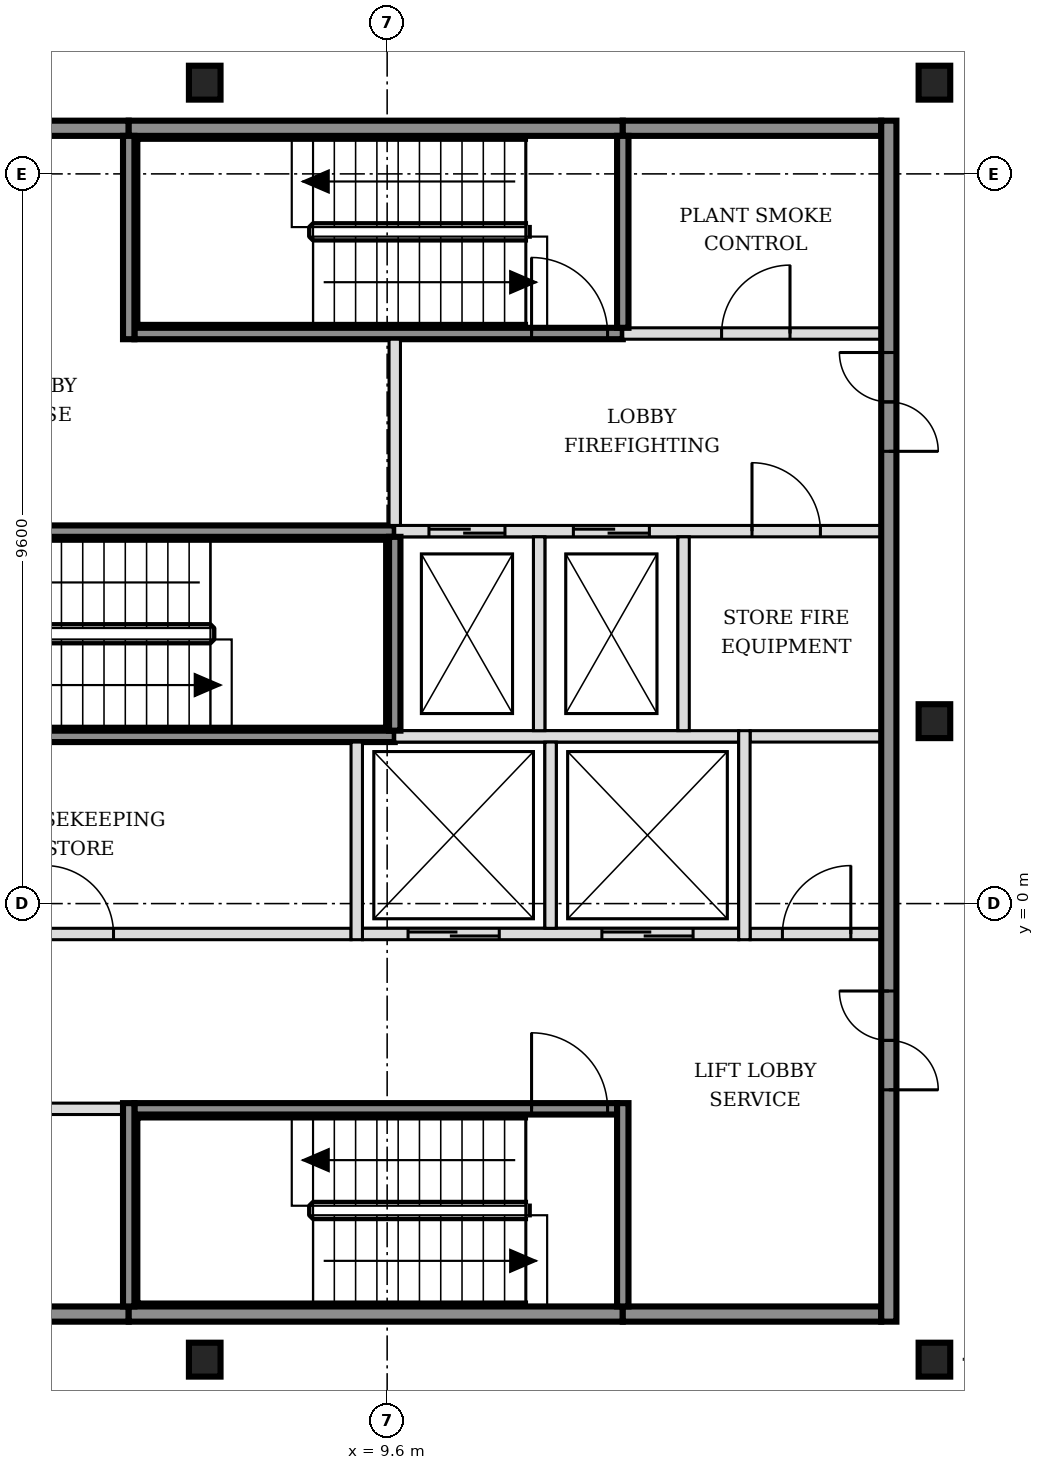
"""IFC4 building model, lengths in metres.
Left out: names, types, materials, properties, quantities, classifications, styles, units other than length and angle.
Written with IfcOpenShell. Run it as: python <this file> out.ifc"""

import sys

from ifc_helpers import new_model, si_unit, direction, frame, frame_2d, origin, origin_2d, place, context, subcontext, project, spatial, rectangle, i_section, extrude, element, fill, save


model = new_model("IFC4")
c1 = context("Model", 3, precision=1e-05, world=origin(), true_north=direction((0.0, 1.0)))
c2 = subcontext(c1, "Body", "Model", "MODEL_VIEW")
j1 = project(units=[si_unit("LENGTHUNIT", "METRE"), si_unit("PLANEANGLEUNIT", "RADIAN")], contexts=[c1])
p1 = place(None, origin())
s1 = spatial("IfcSite", under=j1, at=p1, CompositionType="ELEMENT")
p2 = place(p1, origin())
s2 = spatial("IfcBuilding", under=s1, at=p2, CompositionType="ELEMENT")
p3 = place(p2, frame((0.0, 0.0, 168.6)))
s3 = spatial("IfcBuildingStorey", under=s2, at=p3, CompositionType="ELEMENT", Elevation=168.6)
for number, where, z_axis, x_axis in (
    (1, (7.2, -6.0, -0.15), (0.0, 0.0, 1.0), (1.0, 0.0, 0.0)),
    (2, (16.8, -6.0, -0.15), (0.0, 0.0, 1.0), (1.0, 0.0, 0.0)),
    (3, (16.8, 2.4, -0.15), (0.0, 0.0, 1.0), (1.0, 0.0, 0.0)),
    (4, (7.2, 10.8, -0.15), (0.0, 0.0, 1.0), (1.0, 0.0, 0.0)),
    (5, (16.8, 10.8, -0.15), (0.0, 0.0, 1.0), (1.0, 0.0, 0.0)),
):
    element("IfcColumn", number, at=place(p3, frame(where, z_axis=z_axis, x_axis=x_axis)), inside=s3, PredefinedType="COLUMN", context=c2, shape_type="SweptSolid", body=[
        extrude(i_section(OverallWidth=0.416, OverallDepth=0.446, WebThickness=0.039, FlangeThickness=0.063, FilletRadius=0.015, at=origin_2d()), origin(), (0.0, 0.0, 1.0), 3.6),
    ])
p4 = place(p3, frame((-1.7, -5.4, 0.0), z_axis=(0.0, 0.0, 1.0), x_axis=(1.0, 0.0, 0.0)))
e6 = element("IfcWall", 6, at=p4, inside=s3, PredefinedType="SOLIDWALL", context=c2, shape_type="SweptSolid", body=[
    extrude(rectangle(XDim=7.9, YDim=0.2, at=frame_2d((3.95, 0.0))), origin(), (0.0, 0.0, 1.0), 3.45),
])
p5 = place(p3, frame((6.2, -5.4, 0.0), z_axis=(0.0, 0.0, 1.0), x_axis=(1.0, 0.0, 0.0)))
e7 = element("IfcWall", 7, at=p5, inside=s3, PredefinedType="SOLIDWALL", context=c2, shape_type="SweptSolid", body=[
    extrude(rectangle(XDim=6.5, YDim=0.2, at=frame_2d((3.25, 0.0))), origin(), (0.0, 0.0, 1.0), 3.45),
])
p6 = place(p3, frame((12.7, -5.4, 0.0), z_axis=(0.0, 0.0, 1.0), x_axis=(1.0, 0.0, 0.0)))
e8 = element("IfcWall", 8, at=p6, inside=s3, PredefinedType="SOLIDWALL", context=c2, shape_type="SweptSolid", body=[
    extrude(rectangle(XDim=3.4, YDim=0.2, at=frame_2d((1.7, 0.0))), origin(), (0.0, 0.0, 1.0), 3.45),
])
p7 = place(p3, frame((-1.7, -2.7, 0.0), z_axis=(0.0, 0.0, 1.0), x_axis=(1.0, 0.0, 0.0)))
e9 = element("IfcWall", 9, at=p7, inside=s3, PredefinedType="PARTITIONING", context=c2, shape_type="SweptSolid", body=[
    extrude(rectangle(XDim=7.825, YDim=0.15, at=frame_2d((3.913, 0.0))), origin(), (0.0, 0.0, 1.0), 3.45),
])
p8 = place(p7, frame((3.45, 0.0, 0.0)))
e10 = element("IfcOpeningElement", 10, at=p8, cuts=e9, PredefinedType="OPENING", context=c2, shape_type="SweptSolid", body=[
    extrude(rectangle(XDim=0.9, YDim=2.1, at=frame_2d((0.45, 1.05))), frame((0.0, 0.085, 0.0), z_axis=(0.0, -1.0, 0.0), x_axis=(1.0, 0.0, 0.0)), (0.0, 0.0, 1.0), 0.17),
])
p9 = place(p3, frame((6.275, -2.7, 0.0), z_axis=(0.0, 0.0, 1.0), x_axis=(1.0, 0.0, 0.0)))
e11 = element("IfcWall", 11, at=p9, inside=s3, PredefinedType="SOLIDWALL", context=c2, shape_type="SweptSolid", body=[
    extrude(rectangle(XDim=6.35, YDim=0.15, at=frame_2d((3.175, 0.0))), origin(), (0.0, 0.0, 1.0), 3.45),
])
p10 = place(p9, frame((5.225, 0.0, 0.0)))
e12 = element("IfcOpeningElement", 12, at=p10, cuts=e11, PredefinedType="OPENING", context=c2, shape_type="SweptSolid", body=[
    extrude(rectangle(XDim=1.0, YDim=2.1, at=frame_2d((0.5, 1.05))), frame((0.0, 0.085, 0.0), z_axis=(0.0, -1.0, 0.0), x_axis=(1.0, 0.0, 0.0)), (0.0, 0.0, 1.0), 0.17),
])
p11 = place(p3, frame((-1.7, -0.4, 0.0), z_axis=(0.0, 0.0, 1.0), x_axis=(1.0, 0.0, 0.0)))
e13 = element("IfcWall", 13, at=p11, inside=s3, PredefinedType="PARTITIONING", context=c2, shape_type="SweptSolid", body=[
    extrude(rectangle(XDim=10.825, YDim=0.15, at=frame_2d((5.413, 0.0))), origin(), (0.0, 0.0, 1.0), 3.45),
])
p12 = place(p11, frame((1.3, 0.0, 0.0)))
e14 = element("IfcOpeningElement", 14, at=p12, cuts=e13, PredefinedType="OPENING", context=c2, shape_type="SweptSolid", body=[
    extrude(rectangle(XDim=0.9, YDim=2.1, at=frame_2d((0.45, 1.05))), frame((0.0, 0.085, 0.0), z_axis=(0.0, -1.0, 0.0), x_axis=(1.0, 0.0, 0.0)), (0.0, 0.0, 1.0), 0.17),
])
p13 = place(p11, frame((6.8, 0.0, 0.0)))
e15 = element("IfcOpeningElement", 15, at=p13, cuts=e13, PredefinedType="OPENING", context=c2, shape_type="SweptSolid", body=[
    extrude(rectangle(XDim=0.9, YDim=2.1, at=frame_2d((0.45, 1.05))), frame((0.0, 0.085, 0.0), z_axis=(0.0, -1.0, 0.0), x_axis=(1.0, 0.0, 0.0)), (0.0, 0.0, 1.0), 0.17),
])
p14 = place(p3, frame((9.275, -0.4, 0.0), z_axis=(0.0, 0.0, 1.0), x_axis=(1.0, 0.0, 0.0)))
e16 = element("IfcWall", 16, at=p14, inside=s3, PredefinedType="SOLIDWALL", context=c2, shape_type="SweptSolid", body=[
    extrude(rectangle(XDim=4.95, YDim=0.15, at=frame_2d((2.475, 0.0))), origin(), (0.0, 0.0, 1.0), 3.45),
])
p15 = place(p14, frame((0.6, 0.0, 0.0)))
e17 = element("IfcOpeningElement", 17, at=p15, cuts=e16, PredefinedType="OPENING", context=c2, shape_type="SweptSolid", body=[
    extrude(rectangle(XDim=1.2, YDim=2.1, at=frame_2d((0.6, 1.05))), frame((0.0, 0.085, 0.0), z_axis=(0.0, -1.0, 0.0), x_axis=(1.0, 0.0, 0.0)), (0.0, 0.0, 1.0), 0.17),
])
p16 = place(p14, frame((3.15, 0.0, 0.0)))
e18 = element("IfcOpeningElement", 18, at=p16, cuts=e16, PredefinedType="OPENING", context=c2, shape_type="SweptSolid", body=[
    extrude(rectangle(XDim=1.2, YDim=2.1, at=frame_2d((0.6, 1.05))), frame((0.0, 0.085, 0.0), z_axis=(0.0, -1.0, 0.0), x_axis=(1.0, 0.0, 0.0)), (0.0, 0.0, 1.0), 0.17),
])
p17 = place(p3, frame((14.375, -0.4, 0.0), z_axis=(0.0, 0.0, 1.0), x_axis=(1.0, 0.0, 0.0)))
e19 = element("IfcWall", 19, at=p17, inside=s3, PredefinedType="PARTITIONING", context=c2, shape_type="SweptSolid", body=[
    extrude(rectangle(XDim=1.725, YDim=0.15, at=frame_2d((0.863, 0.0))), origin(), (0.0, 0.0, 1.0), 3.45),
])
p18 = place(p17, frame((0.425, 0.0, 0.0)))
e20 = element("IfcOpeningElement", 20, at=p18, cuts=e19, PredefinedType="OPENING", context=c2, shape_type="SweptSolid", body=[
    extrude(rectangle(XDim=0.9, YDim=2.1, at=frame_2d((0.45, 1.05))), frame((0.0, 0.085, 0.0), z_axis=(0.0, -1.0, 0.0), x_axis=(1.0, 0.0, 0.0)), (0.0, 0.0, 1.0), 0.17),
])
p19 = place(p3, frame((3.2, 2.2, 0.0), z_axis=(0.0, 0.0, 1.0), x_axis=(1.0, 0.0, 0.0)))
e21 = element("IfcWall", 21, at=p19, inside=s3, PredefinedType="SOLIDWALL", context=c2, shape_type="SweptSolid", body=[
    extrude(rectangle(XDim=6.5, YDim=0.15, at=frame_2d((3.25, 0.0))), origin(), (0.0, 0.0, 1.0), 3.45),
])
p20 = place(p3, frame((9.7, 2.2, 0.0), z_axis=(0.0, 0.0, 1.0), x_axis=(1.0, 0.0, 0.0)))
e22 = element("IfcWall", 22, at=p20, inside=s3, PredefinedType="SOLIDWALL", context=c2, shape_type="SweptSolid", body=[
    extrude(rectangle(XDim=4.525, YDim=0.15, at=frame_2d((2.263, 0.0))), origin(), (0.0, 0.0, 1.0), 3.45),
])
p21 = place(p3, frame((14.375, 2.2, 0.0), z_axis=(0.0, 0.0, 1.0), x_axis=(1.0, 0.0, 0.0)))
e23 = element("IfcWall", 23, at=p21, inside=s3, PredefinedType="PARTITIONING", context=c2, shape_type="SweptSolid", body=[
    extrude(rectangle(XDim=1.725, YDim=0.15, at=frame_2d((0.863, 0.0))), origin(), (0.0, 0.0, 1.0), 3.45),
])
p22 = place(p3, frame((3.2, 4.9, 0.0), z_axis=(0.0, 0.0, 1.0), x_axis=(1.0, 0.0, 0.0)))
e24 = element("IfcWall", 24, at=p22, inside=s3, PredefinedType="SOLIDWALL", context=c2, shape_type="SweptSolid", body=[
    extrude(rectangle(XDim=6.5, YDim=0.15, at=frame_2d((3.25, 0.0))), origin(), (0.0, 0.0, 1.0), 3.45),
])
p23 = place(p22, frame((0.175, 0.0, 0.0)))
e25 = element("IfcOpeningElement", 25, at=p23, cuts=e24, PredefinedType="OPENING", context=c2, shape_type="SweptSolid", body=[
    extrude(rectangle(XDim=1.0, YDim=2.1, at=frame_2d((0.5, 1.05))), frame((0.0, 0.085, 0.0), z_axis=(0.0, -1.0, 0.0), x_axis=(1.0, 0.0, 0.0)), (0.0, 0.0, 1.0), 0.17),
])
p24 = place(p3, frame((9.7, 4.9, 0.0), z_axis=(0.0, 0.0, 1.0), x_axis=(1.0, 0.0, 0.0)))
e26 = element("IfcWall", 26, at=p24, inside=s3, PredefinedType="SOLIDWALL", context=c2, shape_type="SweptSolid", body=[
    extrude(rectangle(XDim=6.4, YDim=0.15, at=frame_2d((3.2, 0.0))), origin(), (0.0, 0.0, 1.0), 3.45),
])
p25 = place(p24, frame((0.45, 0.0, 0.0)))
e27 = element("IfcOpeningElement", 27, at=p25, cuts=e26, PredefinedType="OPENING", context=c2, shape_type="SweptSolid", body=[
    extrude(rectangle(XDim=1.0, YDim=2.1, at=frame_2d((0.5, 1.05))), frame((0.0, 0.085, 0.0), z_axis=(0.0, -1.0, 0.0), x_axis=(1.0, 0.0, 0.0)), (0.0, 0.0, 1.0), 0.17),
])
p26 = place(p24, frame((2.35, 0.0, 0.0)))
e28 = element("IfcOpeningElement", 28, at=p26, cuts=e26, PredefinedType="OPENING", context=c2, shape_type="SweptSolid", body=[
    extrude(rectangle(XDim=1.0, YDim=2.1, at=frame_2d((0.5, 1.05))), frame((0.0, 0.085, 0.0), z_axis=(0.0, -1.0, 0.0), x_axis=(1.0, 0.0, 0.0)), (0.0, 0.0, 1.0), 0.17),
])
p27 = place(p24, frame((4.7, 0.0, 0.0)))
e29 = element("IfcOpeningElement", 29, at=p27, cuts=e26, PredefinedType="OPENING", context=c2, shape_type="SweptSolid", body=[
    extrude(rectangle(XDim=0.9, YDim=2.1, at=frame_2d((0.45, 1.05))), frame((0.0, 0.085, 0.0), z_axis=(0.0, -1.0, 0.0), x_axis=(1.0, 0.0, 0.0)), (0.0, 0.0, 1.0), 0.17),
])
p28 = place(p3, frame((6.275, 7.5, 0.0), z_axis=(0.0, 0.0, 1.0), x_axis=(1.0, 0.0, 0.0)))
e30 = element("IfcWall", 30, at=p28, inside=s3, PredefinedType="SOLIDWALL", context=c2, shape_type="SweptSolid", body=[
    extrude(rectangle(XDim=6.425, YDim=0.15, at=frame_2d((3.212, 0.0))), origin(), (0.0, 0.0, 1.0), 3.45),
])
p29 = place(p28, frame((5.225, 0.0, 0.0)))
e31 = element("IfcOpeningElement", 31, at=p29, cuts=e30, PredefinedType="OPENING", context=c2, shape_type="SweptSolid", body=[
    extrude(rectangle(XDim=1.0, YDim=2.1, at=frame_2d((0.5, 1.05))), frame((0.0, 0.085, 0.0), z_axis=(0.0, -1.0, 0.0), x_axis=(1.0, 0.0, 0.0)), (0.0, 0.0, 1.0), 0.17),
])
p30 = place(p3, frame((12.7, 7.5, 0.0), z_axis=(0.0, 0.0, 1.0), x_axis=(1.0, 0.0, 0.0)))
e32 = element("IfcWall", 32, at=p30, inside=s3, PredefinedType="SOLIDWALL", context=c2, shape_type="SweptSolid", body=[
    extrude(rectangle(XDim=3.4, YDim=0.15, at=frame_2d((1.7, 0.0))), origin(), (0.0, 0.0, 1.0), 3.45),
])
p31 = place(p30, frame((1.3, 0.0, 0.0)))
e33 = element("IfcOpeningElement", 33, at=p31, cuts=e32, PredefinedType="OPENING", context=c2, shape_type="SweptSolid", body=[
    extrude(rectangle(XDim=0.9, YDim=2.1, at=frame_2d((0.45, 1.05))), frame((0.0, 0.085, 0.0), z_axis=(0.0, -1.0, 0.0), x_axis=(1.0, 0.0, 0.0)), (0.0, 0.0, 1.0), 0.17),
])
p32 = place(p3, frame((-1.7, 10.2, 0.0), z_axis=(0.0, 0.0, 1.0), x_axis=(1.0, 0.0, 0.0)))
e34 = element("IfcWall", 34, at=p32, inside=s3, PredefinedType="SOLIDWALL", context=c2, shape_type="SweptSolid", body=[
    extrude(rectangle(XDim=7.9, YDim=0.2, at=frame_2d((3.95, 0.0))), origin(), (0.0, 0.0, 1.0), 3.45),
])
p33 = place(p3, frame((6.2, 10.2, 0.0), z_axis=(0.0, 0.0, 1.0), x_axis=(1.0, 0.0, 0.0)))
e35 = element("IfcWall", 35, at=p33, inside=s3, PredefinedType="SOLIDWALL", context=c2, shape_type="SweptSolid", body=[
    extrude(rectangle(XDim=6.5, YDim=0.2, at=frame_2d((3.25, 0.0))), origin(), (0.0, 0.0, 1.0), 3.45),
])
p34 = place(p3, frame((12.7, 10.2, 0.0), z_axis=(0.0, 0.0, 1.0), x_axis=(1.0, 0.0, 0.0)))
e36 = element("IfcWall", 36, at=p34, inside=s3, PredefinedType="SOLIDWALL", context=c2, shape_type="SweptSolid", body=[
    extrude(rectangle(XDim=3.4, YDim=0.2, at=frame_2d((1.7, 0.0))), origin(), (0.0, 0.0, 1.0), 3.45),
])
for number, where, z_axis, x_axis in (
    (37, (6.2, -5.3, 0.0), (0.0, 0.0, 1.0), (0.0, 1.0, 0.0)),
    (38, (6.2, 7.425, 0.0), (0.0, 0.0, 1.0), (0.0, 1.0, 0.0)),
):
    element("IfcWall", number, at=place(p3, frame(where, z_axis=z_axis, x_axis=x_axis)), inside=s3, PredefinedType="SOLIDWALL", context=c2, shape_type="SweptSolid", body=[
        extrude(rectangle(XDim=2.675, YDim=0.15, at=frame_2d((1.337, 0.0))), origin(), (0.0, 0.0, 1.0), 3.45),
    ])
p35 = place(p3, frame((9.2, -0.475, 0.0), z_axis=(0.0, 0.0, 1.0), x_axis=(0.0, 1.0, 0.0)))
e39 = element("IfcWall", 39, at=p35, inside=s3, PredefinedType="SOLIDWALL", context=c2, shape_type="SweptSolid", body=[
    extrude(rectangle(XDim=2.6, YDim=0.15, at=frame_2d((1.3, 0.0))), origin(), (0.0, 0.0, 1.0), 3.45),
])
p36 = place(p3, frame((9.7, 2.275, 0.0), z_axis=(0.0, 0.0, 1.0), x_axis=(0.0, 1.0, 0.0)))
e40 = element("IfcWall", 40, at=p36, inside=s3, PredefinedType="SOLIDWALL", context=c2, shape_type="SweptSolid", body=[
    extrude(rectangle(XDim=2.55, YDim=0.15, at=frame_2d((1.275, 0.0))), origin(), (0.0, 0.0, 1.0), 3.45),
])
p37 = place(p3, frame((9.7, 4.975, 0.0), z_axis=(0.0, 0.0, 1.0), x_axis=(0.0, 1.0, 0.0)))
e41 = element("IfcWall", 41, at=p37, inside=s3, PredefinedType="SOLIDWALL", context=c2, shape_type="SweptSolid", body=[
    extrude(rectangle(XDim=2.45, YDim=0.15, at=frame_2d((1.225, 0.0))), origin(), (0.0, 0.0, 1.0), 3.45),
])
p38 = place(p3, frame((11.6, 2.275, 0.0), z_axis=(0.0, 0.0, 1.0), x_axis=(0.0, 1.0, 0.0)))
e42 = element("IfcWall", 42, at=p38, inside=s3, PredefinedType="SOLIDWALL", context=c2, shape_type="SweptSolid", body=[
    extrude(rectangle(XDim=2.55, YDim=0.15, at=frame_2d((1.275, 0.0))), origin(), (0.0, 0.0, 1.0), 3.45),
])
p39 = place(p3, frame((11.75, -0.325, 0.0), z_axis=(0.0, 0.0, 1.0), x_axis=(0.0, 1.0, 0.0)))
e43 = element("IfcWall", 43, at=p39, inside=s3, PredefinedType="SOLIDWALL", context=c2, shape_type="SweptSolid", body=[
    extrude(rectangle(XDim=2.45, YDim=0.15, at=frame_2d((1.225, 0.0))), origin(), (0.0, 0.0, 1.0), 3.45),
])
p40 = place(p3, frame((12.7, -5.3, 0.0), z_axis=(0.0, 0.0, 1.0), x_axis=(0.0, 1.0, 0.0)))
e44 = element("IfcWall", 44, at=p40, inside=s3, PredefinedType="SOLIDWALL", context=c2, shape_type="SweptSolid", body=[
    extrude(rectangle(XDim=2.675, YDim=0.15, at=frame_2d((1.337, 0.0))), origin(), (0.0, 0.0, 1.0), 3.45),
])
p41 = place(p3, frame((12.7, 7.575, 0.0), z_axis=(0.0, 0.0, 1.0), x_axis=(0.0, 1.0, 0.0)))
e45 = element("IfcWall", 45, at=p41, inside=s3, PredefinedType="SOLIDWALL", context=c2, shape_type="SweptSolid", body=[
    extrude(rectangle(XDim=2.525, YDim=0.15, at=frame_2d((1.263, 0.0))), origin(), (0.0, 0.0, 1.0), 3.45),
])
p42 = place(p3, frame((13.5, 2.275, 0.0), z_axis=(0.0, 0.0, 1.0), x_axis=(0.0, 1.0, 0.0)))
e46 = element("IfcWall", 46, at=p42, inside=s3, PredefinedType="SOLIDWALL", context=c2, shape_type="SweptSolid", body=[
    extrude(rectangle(XDim=2.55, YDim=0.15, at=frame_2d((1.275, 0.0))), origin(), (0.0, 0.0, 1.0), 3.45),
])
p43 = place(p3, frame((14.3, -0.475, 0.0), z_axis=(0.0, 0.0, 1.0), x_axis=(0.0, 1.0, 0.0)))
e47 = element("IfcWall", 47, at=p43, inside=s3, PredefinedType="SOLIDWALL", context=c2, shape_type="SweptSolid", body=[
    extrude(rectangle(XDim=2.75, YDim=0.15, at=frame_2d((1.375, 0.0))), origin(), (0.0, 0.0, 1.0), 3.45),
])
p44 = place(p3, frame((16.2, -5.5, 0.0), z_axis=(0.0, 0.0, 1.0), x_axis=(0.0, 1.0, 0.0)))
e48 = element("IfcWall", 48, at=p44, inside=s3, PredefinedType="SOLIDWALL", context=c2, shape_type="SweptSolid", body=[
    extrude(rectangle(XDim=15.8, YDim=0.2, at=frame_2d((7.9, 0.0))), origin(), (0.0, 0.0, 1.0), 3.45),
])
p45 = place(p44, frame((3.05, 0.0, 0.0)))
e49 = element("IfcOpeningElement", 49, at=p45, cuts=e48, PredefinedType="OPENING", context=c2, shape_type="SweptSolid", body=[
    extrude(rectangle(XDim=1.3, YDim=2.1, at=frame_2d((0.65, 1.05))), frame((0.0, 0.11, 0.0), z_axis=(0.0, -1.0, 0.0), x_axis=(1.0, 0.0, 0.0)), (0.0, 0.0, 1.0), 0.22),
])
p46 = place(p44, frame((11.45, 0.0, 0.0)))
e50 = element("IfcOpeningElement", 50, at=p46, cuts=e48, PredefinedType="OPENING", context=c2, shape_type="SweptSolid", body=[
    extrude(rectangle(XDim=1.3, YDim=2.1, at=frame_2d((0.65, 1.05))), frame((0.0, 0.11, 0.0), z_axis=(0.0, -1.0, 0.0), x_axis=(1.0, 0.0, 0.0)), (0.0, 0.0, 1.0), 0.22),
])
p47 = place(p15, origin())
e51 = element("IfcDoor", 51, at=p47, inside=s3, OperationType="DOUBLE_DOOR_SLIDING", PredefinedType="DOOR", context=c2, shape_type="SweptSolid", body=[
    extrude(rectangle(XDim=1.2, YDim=2.1, at=frame_2d((0.6, 1.05))), frame((0.0, 0.025, 0.0), z_axis=(0.0, -1.0, 0.0), x_axis=(1.0, 0.0, 0.0)), (0.0, 0.0, 1.0), 0.05),
])
fill(e17, e51)
p48 = place(p16, origin())
e52 = element("IfcDoor", 52, at=p48, inside=s3, OperationType="DOUBLE_DOOR_SLIDING", PredefinedType="DOOR", context=c2, shape_type="SweptSolid", body=[
    extrude(rectangle(XDim=1.2, YDim=2.1, at=frame_2d((0.6, 1.05))), frame((0.0, 0.025, 0.0), z_axis=(0.0, -1.0, 0.0), x_axis=(1.0, 0.0, 0.0)), (0.0, 0.0, 1.0), 0.05),
])
fill(e18, e52)
p49 = place(p25, origin())
e53 = element("IfcDoor", 53, at=p49, inside=s3, OperationType="DOUBLE_DOOR_SLIDING", PredefinedType="DOOR", context=c2, shape_type="SweptSolid", body=[
    extrude(rectangle(XDim=1.0, YDim=2.1, at=frame_2d((0.5, 1.05))), frame((0.0, 0.025, 0.0), z_axis=(0.0, -1.0, 0.0), x_axis=(1.0, 0.0, 0.0)), (0.0, 0.0, 1.0), 0.05),
])
fill(e27, e53)
p50 = place(p26, origin())
e54 = element("IfcDoor", 54, at=p50, inside=s3, OperationType="DOUBLE_DOOR_SLIDING", PredefinedType="DOOR", context=c2, shape_type="SweptSolid", body=[
    extrude(rectangle(XDim=1.0, YDim=2.1, at=frame_2d((0.5, 1.05))), frame((0.0, 0.025, 0.0), z_axis=(0.0, -1.0, 0.0), x_axis=(1.0, 0.0, 0.0)), (0.0, 0.0, 1.0), 0.05),
])
fill(e28, e54)
p51 = place(p10, origin())
e55 = element("IfcDoor", 55, at=p51, inside=s3, OperationType="SINGLE_SWING_LEFT", PredefinedType="DOOR", context=c2, shape_type="SweptSolid", body=[
    extrude(rectangle(XDim=1.0, YDim=2.1, at=frame_2d((0.5, 1.05))), frame((0.0, 0.025, 0.0), z_axis=(0.0, -1.0, 0.0), x_axis=(1.0, 0.0, 0.0)), (0.0, 0.0, 1.0), 0.05),
])
fill(e12, e55)
p52 = place(p29, origin())
e56 = element("IfcDoor", 56, at=p52, inside=s3, OperationType="SINGLE_SWING_LEFT", PredefinedType="DOOR", context=c2, shape_type="SweptSolid", body=[
    extrude(rectangle(XDim=1.0, YDim=2.1, at=frame_2d((0.5, 1.05))), frame((0.0, 0.025, 0.0), z_axis=(0.0, -1.0, 0.0), x_axis=(1.0, 0.0, 0.0)), (0.0, 0.0, 1.0), 0.05),
])
fill(e31, e56)
p53 = place(p45, origin())
e57 = element("IfcDoor", 57, at=p53, inside=s3, OperationType="DOUBLE_DOOR_SINGLE_SWING", PredefinedType="DOOR", context=c2, shape_type="SweptSolid", body=[
    extrude(rectangle(XDim=1.3, YDim=2.1, at=frame_2d((0.65, 1.05))), frame((0.0, 0.025, 0.0), z_axis=(0.0, -1.0, 0.0), x_axis=(1.0, 0.0, 0.0)), (0.0, 0.0, 1.0), 0.05),
])
fill(e49, e57)
p54 = place(p46, origin())
e58 = element("IfcDoor", 58, at=p54, inside=s3, OperationType="DOUBLE_DOOR_SINGLE_SWING", PredefinedType="DOOR", context=c2, shape_type="SweptSolid", body=[
    extrude(rectangle(XDim=1.3, YDim=2.1, at=frame_2d((0.65, 1.05))), frame((0.0, 0.025, 0.0), z_axis=(0.0, -1.0, 0.0), x_axis=(1.0, 0.0, 0.0)), (0.0, 0.0, 1.0), 0.05),
])
fill(e50, e58)
p55 = place(p18, origin())
e59 = element("IfcDoor", 59, at=p55, inside=s3, OperationType="SINGLE_SWING_RIGHT", PredefinedType="DOOR", context=c2, shape_type="SweptSolid", body=[
    extrude(rectangle(XDim=0.9, YDim=2.1, at=frame_2d((0.45, 1.05))), frame((0.0, 0.025, 0.0), z_axis=(0.0, -1.0, 0.0), x_axis=(1.0, 0.0, 0.0)), (0.0, 0.0, 1.0), 0.05),
])
fill(e20, e59)
p56 = place(p27, origin())
e60 = element("IfcDoor", 60, at=p56, inside=s3, OperationType="SINGLE_SWING_LEFT", PredefinedType="DOOR", context=c2, shape_type="SweptSolid", body=[
    extrude(rectangle(XDim=0.9, YDim=2.1, at=frame_2d((0.45, 1.05))), frame((0.0, 0.025, 0.0), z_axis=(0.0, -1.0, 0.0), x_axis=(1.0, 0.0, 0.0)), (0.0, 0.0, 1.0), 0.05),
])
fill(e29, e60)
p57 = place(p31, origin())
e61 = element("IfcDoor", 61, at=p57, inside=s3, OperationType="SINGLE_SWING_RIGHT", PredefinedType="DOOR", context=c2, shape_type="SweptSolid", body=[
    extrude(rectangle(XDim=0.9, YDim=2.1, at=frame_2d((0.45, 1.05))), frame((0.0, 0.025, 0.0), z_axis=(0.0, -1.0, 0.0), x_axis=(1.0, 0.0, 0.0)), (0.0, 0.0, 1.0), 0.05),
])
fill(e33, e61)
p58 = place(p13, origin())
e62 = element("IfcDoor", 62, at=p58, inside=s3, OperationType="SINGLE_SWING_LEFT", PredefinedType="DOOR", context=c2, shape_type="SweptSolid", body=[
    extrude(rectangle(XDim=0.9, YDim=2.1, at=frame_2d((0.45, 1.05))), frame((0.0, 0.025, 0.0), z_axis=(0.0, -1.0, 0.0), x_axis=(1.0, 0.0, 0.0)), (0.0, 0.0, 1.0), 0.05),
])
fill(e15, e62)
save(model, sys.argv[1])
